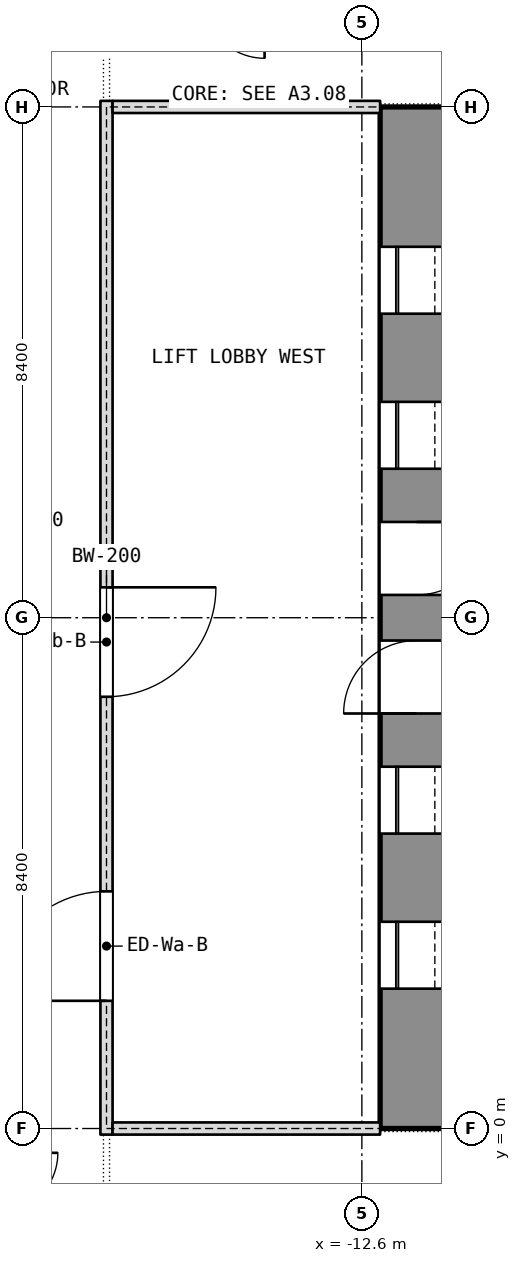
"""IFC4 building model, lengths in metres.
Left out: names, types, materials, properties, quantities, classifications, styles, units other than length and angle.
Written with IfcOpenShell. Run it as: python <this file> out.ifc"""

import sys

from ifc_helpers import new_model, si_unit, direction, frame, frame_2d, origin, place, context, subcontext, project, spatial, rectangle, extrude, element, fill, save


model = new_model("IFC4")
c1 = context("Model", 3, precision=1e-05, world=origin(), true_north=direction((0.0, 1.0)))
c2 = subcontext(c1, "Body", "Model", "MODEL_VIEW")
j1 = project(units=[si_unit("LENGTHUNIT", "METRE"), si_unit("PLANEANGLEUNIT", "RADIAN")], contexts=[c1])
p1 = place(None, origin())
s1 = spatial("IfcSite", under=j1, at=p1, CompositionType="ELEMENT")
p2 = place(p1, origin())
s2 = spatial("IfcBuilding", under=s1, at=p2, CompositionType="ELEMENT")
p3 = place(p2, frame((0.0, 0.0, 76.1)))
s3 = spatial("IfcBuildingStorey", under=s2, at=p3, CompositionType="ELEMENT", Elevation=76.1)
p4 = place(p3, frame((-11.7, 0.0, 0.0), z_axis=(0.0, 0.0, 1.0), x_axis=(0.0, 1.0, 0.0)))
e1 = element("IfcWall", 1, at=p4, inside=s3, PredefinedType="SHEAR", context=c2, shape_type="SweptSolid", body=[
    extrude(rectangle(XDim=16.8, YDim=1.2, at=frame_2d((8.4, 0.0))), origin(), (0.0, 0.0, 1.0), 3.6),
])
p5 = place(p4, frame((2.3, 0.0, 0.0)))
e2 = element("IfcOpeningElement", 2, at=p5, cuts=e1, PredefinedType="OPENING", context=c2, shape_type="SweptSolid", body=[
    extrude(rectangle(XDim=1.1, YDim=2.1, at=frame_2d((0.55, 1.05))), frame((0.0, 0.6, 0.0), z_axis=(0.0, -1.0, 0.0), x_axis=(1.0, 0.0, 0.0)), (0.0, 0.0, 1.0), 1.2),
])
p6 = place(p4, frame((4.85, 0.0, 0.0)))
e3 = element("IfcOpeningElement", 3, at=p6, cuts=e1, PredefinedType="OPENING", context=c2, shape_type="SweptSolid", body=[
    extrude(rectangle(XDim=1.1, YDim=2.1, at=frame_2d((0.55, 1.05))), frame((0.0, 0.6, 0.0), z_axis=(0.0, -1.0, 0.0), x_axis=(1.0, 0.0, 0.0)), (0.0, 0.0, 1.0), 1.2),
])
p7 = place(p4, frame((6.825, 0.0, 0.0)))
e4 = element("IfcOpeningElement", 4, at=p7, cuts=e1, PredefinedType="OPENING", context=c2, shape_type="SweptSolid", body=[
    extrude(rectangle(XDim=1.2, YDim=2.1, at=frame_2d((0.6, 1.05))), frame((0.0, 0.6, 0.0), z_axis=(0.0, -1.0, 0.0), x_axis=(1.0, 0.0, 0.0)), (0.0, 0.0, 1.0), 1.2),
])
p8 = place(p4, frame((13.4, 0.0, 0.0)))
e5 = element("IfcOpeningElement", 5, at=p8, cuts=e1, PredefinedType="OPENING", context=c2, shape_type="SweptSolid", body=[
    extrude(rectangle(XDim=1.1, YDim=2.1, at=frame_2d((0.55, 1.05))), frame((0.0, 0.6, 0.0), z_axis=(0.0, -1.0, 0.0), x_axis=(1.0, 0.0, 0.0)), (0.0, 0.0, 1.0), 1.2),
])
p9 = place(p4, frame((10.85, 0.0, 0.0)))
e6 = element("IfcOpeningElement", 6, at=p9, cuts=e1, PredefinedType="OPENING", context=c2, shape_type="SweptSolid", body=[
    extrude(rectangle(XDim=1.1, YDim=2.1, at=frame_2d((0.55, 1.05))), frame((0.0, 0.6, 0.0), z_axis=(0.0, -1.0, 0.0), x_axis=(1.0, 0.0, 0.0)), (0.0, 0.0, 1.0), 1.2),
])
p10 = place(p4, frame((8.775, 0.0, 0.0)))
e7 = element("IfcOpeningElement", 7, at=p10, cuts=e1, PredefinedType="OPENING", context=c2, shape_type="SweptSolid", body=[
    extrude(rectangle(XDim=1.2, YDim=2.1, at=frame_2d((0.6, 1.05))), frame((0.0, 0.6, 0.0), z_axis=(0.0, -1.0, 0.0), x_axis=(1.0, 0.0, 0.0)), (0.0, 0.0, 1.0), 1.2),
])
p11 = place(p3, frame((-16.8, -0.1, 0.0), z_axis=(0.0, 0.0, 1.0), x_axis=(0.0, 1.0, 0.0)))
e8 = element("IfcWall", 8, at=p11, inside=s3, PredefinedType="PARTITIONING", context=c2, shape_type="SweptSolid", body=[
    extrude(rectangle(XDim=17.0, YDim=0.2, at=frame_2d((8.5, 0.0))), origin(), (0.0, 0.0, 1.0), 3.34),
])
p12 = place(p11, frame((2.2, 0.0, 0.0)))
e9 = element("IfcOpeningElement", 9, at=p12, cuts=e8, PredefinedType="OPENING", context=c2, shape_type="SweptSolid", body=[
    extrude(rectangle(XDim=1.8, YDim=2.1, at=frame_2d((0.9, 1.05))), frame((0.0, 0.1, 0.0), z_axis=(0.0, -1.0, 0.0), x_axis=(1.0, 0.0, 0.0)), (0.0, 0.0, 1.0), 0.2),
])
p13 = place(p11, frame((7.2, 0.0, 0.0)))
e10 = element("IfcOpeningElement", 10, at=p13, cuts=e8, PredefinedType="OPENING", context=c2, shape_type="SweptSolid", body=[
    extrude(rectangle(XDim=1.8, YDim=2.1, at=frame_2d((0.9, 1.05))), frame((0.0, 0.1, 0.0), z_axis=(0.0, -1.0, 0.0), x_axis=(1.0, 0.0, 0.0)), (0.0, 0.0, 1.0), 0.2),
])
for number, where, z_axis, x_axis in (
    (11, (-16.7, 0.0, 0.0), (0.0, 0.0, 1.0), (1.0, 0.0, 0.0)),
    (12, (-16.7, 16.8, 0.0), (0.0, 0.0, 1.0), (1.0, 0.0, 0.0)),
):
    element("IfcWall", number, at=place(p3, frame(where, z_axis=z_axis, x_axis=x_axis)), inside=s3, PredefinedType="PARTITIONING", context=c2, shape_type="SweptSolid", body=[
        extrude(rectangle(XDim=4.4, YDim=0.2, at=frame_2d((2.2, 0.0))), origin(), (0.0, 0.0, 1.0), 2.84),
    ])
p14 = place(p5, origin())
e13 = element("IfcDoor", 13, at=p14, inside=s3, OperationType="SLIDING_TO_LEFT", PredefinedType="DOOR", context=c2, shape_type="SweptSolid", body=[
    extrude(rectangle(XDim=1.1, YDim=2.1, at=frame_2d((0.55, 1.05))), frame((0.0, 0.025, 0.0), z_axis=(0.0, -1.0, 0.0), x_axis=(1.0, 0.0, 0.0)), (0.0, 0.0, 1.0), 0.05),
])
fill(e2, e13)
p15 = place(p6, origin())
e14 = element("IfcDoor", 14, at=p15, inside=s3, OperationType="SLIDING_TO_LEFT", PredefinedType="DOOR", context=c2, shape_type="SweptSolid", body=[
    extrude(rectangle(XDim=1.1, YDim=2.1, at=frame_2d((0.55, 1.05))), frame((0.0, 0.025, 0.0), z_axis=(0.0, -1.0, 0.0), x_axis=(1.0, 0.0, 0.0)), (0.0, 0.0, 1.0), 0.05),
])
fill(e3, e14)
p16 = place(p7, origin())
e15 = element("IfcDoor", 15, at=p16, inside=s3, OperationType="SINGLE_SWING_LEFT", PredefinedType="DOOR", context=c2, shape_type="SweptSolid", body=[
    extrude(rectangle(XDim=1.2, YDim=2.1, at=frame_2d((0.6, 1.05))), frame((0.0, 0.025, 0.0), z_axis=(0.0, -1.0, 0.0), x_axis=(1.0, 0.0, 0.0)), (0.0, 0.0, 1.0), 0.05),
])
fill(e4, e15)
p17 = place(p8, origin())
e16 = element("IfcDoor", 16, at=p17, inside=s3, OperationType="SLIDING_TO_LEFT", PredefinedType="DOOR", context=c2, shape_type="SweptSolid", body=[
    extrude(rectangle(XDim=1.1, YDim=2.1, at=frame_2d((0.55, 1.05))), frame((0.0, 0.025, 0.0), z_axis=(0.0, -1.0, 0.0), x_axis=(1.0, 0.0, 0.0)), (0.0, 0.0, 1.0), 0.05),
])
fill(e5, e16)
p18 = place(p9, origin())
e17 = element("IfcDoor", 17, at=p18, inside=s3, OperationType="SLIDING_TO_LEFT", PredefinedType="DOOR", context=c2, shape_type="SweptSolid", body=[
    extrude(rectangle(XDim=1.1, YDim=2.1, at=frame_2d((0.55, 1.05))), frame((0.0, 0.025, 0.0), z_axis=(0.0, -1.0, 0.0), x_axis=(1.0, 0.0, 0.0)), (0.0, 0.0, 1.0), 0.05),
])
fill(e6, e17)
p19 = place(p10, origin())
e18 = element("IfcDoor", 18, at=p19, inside=s3, OperationType="SINGLE_SWING_LEFT", PredefinedType="DOOR", context=c2, shape_type="SweptSolid", body=[
    extrude(rectangle(XDim=1.2, YDim=2.1, at=frame_2d((0.6, 1.05))), frame((0.0, 0.025, 0.0), z_axis=(0.0, -1.0, 0.0), x_axis=(1.0, 0.0, 0.0)), (0.0, 0.0, 1.0), 0.05),
])
fill(e7, e18)
p20 = place(p12, origin())
e19 = element("IfcDoor", 19, at=p20, inside=s3, OperationType="DOUBLE_DOOR_SINGLE_SWING", PredefinedType="DOOR", context=c2, shape_type="SweptSolid", body=[
    extrude(rectangle(XDim=1.8, YDim=2.1, at=frame_2d((0.9, 1.05))), frame((0.0, 0.025, 0.0), z_axis=(0.0, -1.0, 0.0), x_axis=(1.0, 0.0, 0.0)), (0.0, 0.0, 1.0), 0.05),
])
fill(e9, e19)
p21 = place(p13, origin())
e20 = element("IfcDoor", 20, at=p21, inside=s3, OperationType="DOUBLE_DOOR_SINGLE_SWING", PredefinedType="DOOR", context=c2, shape_type="SweptSolid", body=[
    extrude(rectangle(XDim=1.8, YDim=2.1, at=frame_2d((0.9, 1.05))), frame((0.0, 0.025, 0.0), z_axis=(0.0, -1.0, 0.0), x_axis=(1.0, 0.0, 0.0)), (0.0, 0.0, 1.0), 0.05),
])
fill(e10, e20)
save(model, sys.argv[1])
